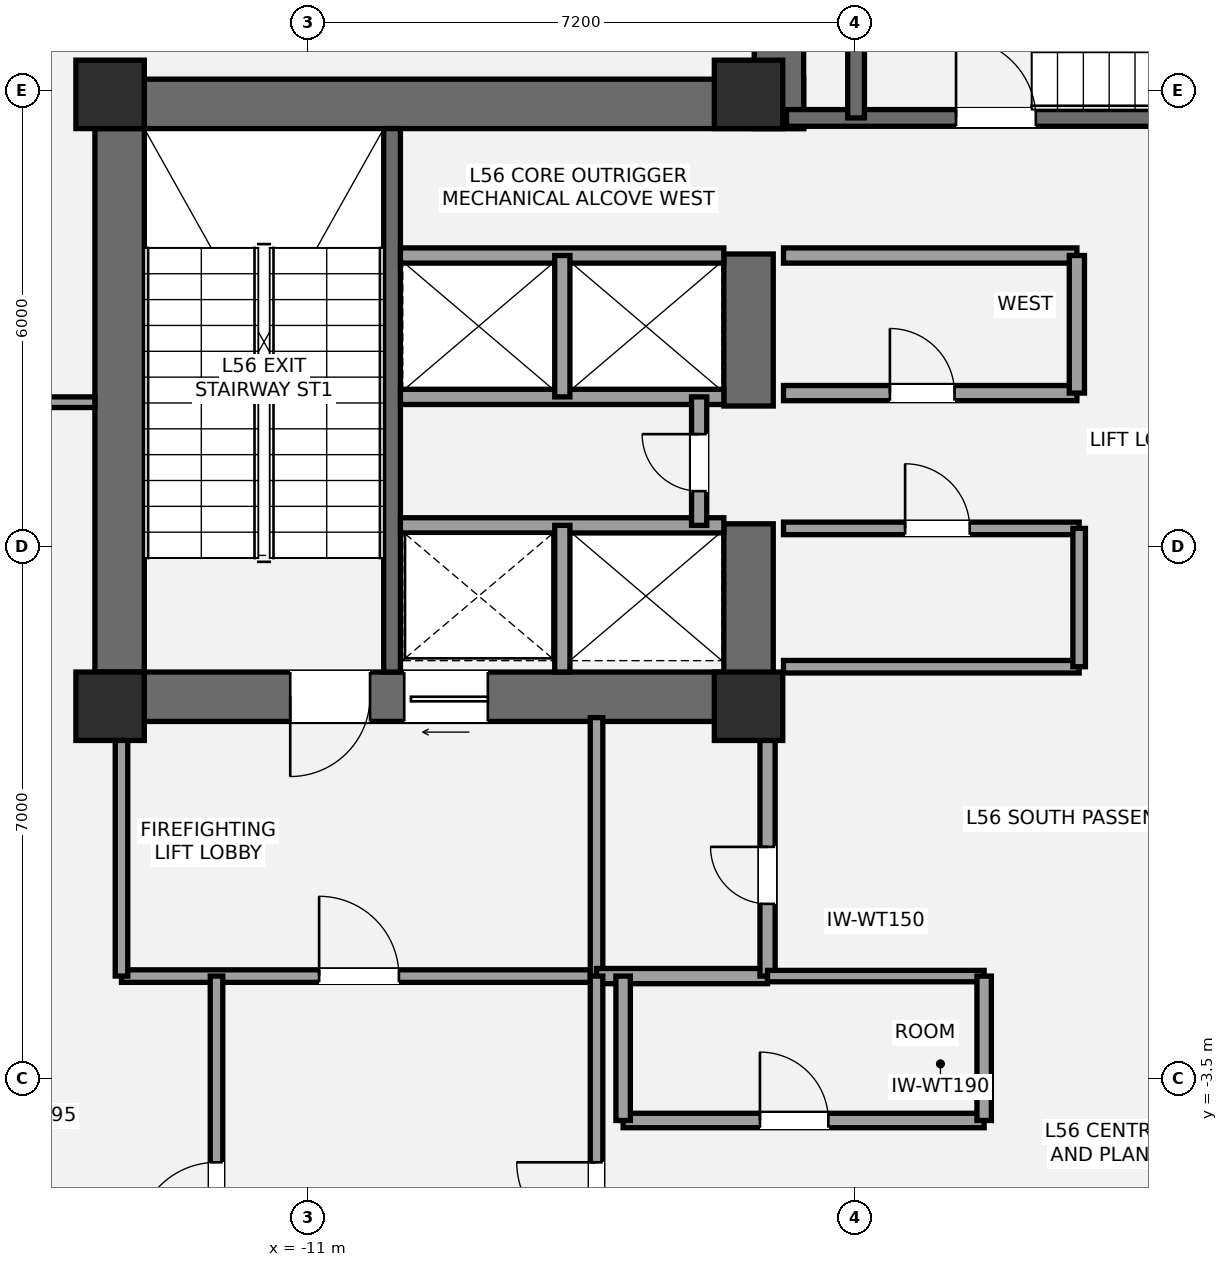
"""IFC4 building model, lengths in metres.
Left out: names, types, materials, properties, quantities, classifications, styles, units other than length and angle.
Written with IfcOpenShell. Run it as: python <this file> out.ifc"""

import sys

from ifc_helpers import new_model, si_unit, direction, frame, frame_2d, origin, origin_2d, place, context, subcontext, project, spatial, rectangle, extrude, element, fill, save


model = new_model("IFC4")
c1 = context("Model", 3, precision=1e-05, world=origin(), true_north=direction((0.0, 1.0)))
c2 = subcontext(c1, "Body", "Model", "MODEL_VIEW")
j1 = project(units=[si_unit("LENGTHUNIT", "METRE"), si_unit("PLANEANGLEUNIT", "RADIAN")], contexts=[c1])
p1 = place(None, origin())
s1 = spatial("IfcSite", under=j1, at=p1, CompositionType="ELEMENT")
p2 = place(p1, origin())
s2 = spatial("IfcBuilding", under=s1, at=p2, CompositionType="ELEMENT")
p3 = place(p2, frame((0.0, 0.0, 201.4)))
s3 = spatial("IfcBuildingStorey", under=s2, at=p3, CompositionType="ELEMENT", Elevation=201.4)
p4 = place(p3, frame((-13.475, 1.2, 0.0), z_axis=(0.0, 0.0, 1.0), x_axis=(0.0, 1.0, 0.0)))
e1 = element("IfcWall", 1, at=p4, inside=s3, PredefinedType="SHEAR", context=c2, shape_type="SweptSolid", body=[
    extrude(rectangle(XDim=8.45, YDim=0.65, at=frame_2d((4.225, 0.0))), origin(), (0.0, 0.0, 1.0), 4.5),
])
p5 = place(p3, frame((-13.8, 9.325, 0.0), z_axis=(0.0, 0.0, 1.0), x_axis=(1.0, 0.0, 0.0)))
e2 = element("IfcWall", 2, at=p5, inside=s3, PredefinedType="SHEAR", context=c2, shape_type="SweptSolid", body=[
    extrude(rectangle(XDim=9.325, YDim=0.65, at=frame_2d((4.663, 0.0))), origin(), (0.0, 0.0, 1.0), 4.5),
])
p6 = place(p3, frame((-4.875, 1.525, 0.0), z_axis=(0.0, 0.0, 1.0), x_axis=(-1.0, 0.0, 0.0)))
e3 = element("IfcWall", 3, at=p6, inside=s3, PredefinedType="SHEAR", context=c2, shape_type="SweptSolid", body=[
    extrude(rectangle(XDim=8.925, YDim=0.65, at=frame_2d((4.462, 0.0))), origin(), (0.0, 0.0, 1.0), 4.5),
])
p7 = place(p6, frame((5.305, 0.0, 0.0)))
e4 = element("IfcOpeningElement", 4, at=p7, cuts=e3, PredefinedType="OPENING", context=c2, shape_type="SweptSolid", body=[
    extrude(rectangle(XDim=1.05, YDim=2.15, at=frame_2d((0.525, 1.075))), frame((0.0, 0.335, 0.0), z_axis=(0.0, -1.0, 0.0), x_axis=(1.0, 0.0, 0.0)), (0.0, 0.0, 1.0), 0.67),
])
p8 = place(p6, frame((3.755, 0.0, 0.0)))
e5 = element("IfcOpeningElement", 5, at=p8, cuts=e3, PredefinedType="OPENING", context=c2, shape_type="SweptSolid", body=[
    extrude(rectangle(XDim=1.1, YDim=2.2, at=frame_2d((0.55, 1.1))), frame((0.0, 0.335, 0.0), z_axis=(0.0, -1.0, 0.0), x_axis=(1.0, 0.0, 0.0)), (0.0, 0.0, 1.0), 0.67),
])
p9 = place(p3, frame((-5.2, 1.2, 0.0), z_axis=(0.0, 0.0, 1.0), x_axis=(0.0, 1.0, 0.0)))
e6 = element("IfcWall", 6, at=p9, inside=s3, PredefinedType="SHEAR", context=c2, shape_type="SweptSolid", body=[
    extrude(rectangle(XDim=2.6, YDim=0.65, at=frame_2d((1.3, 0.0))), origin(), (0.0, 0.0, 1.0), 4.5),
])
p10 = place(p3, frame((-5.2, 5.35, 0.0), z_axis=(0.0, 0.0, 1.0), x_axis=(0.0, 1.0, 0.0)))
e7 = element("IfcWall", 7, at=p10, inside=s3, PredefinedType="SHEAR", context=c2, shape_type="SweptSolid", body=[
    extrude(rectangle(XDim=2.0, YDim=0.65, at=frame_2d((1.0, 0.0))), origin(), (0.0, 0.0, 1.0), 4.5),
])
p11 = place(p3, frame((-9.89, 1.85, 0.0), z_axis=(0.0, 0.0, 1.0), x_axis=(0.0, 1.0, 0.0)))
e8 = element("IfcWall", 8, at=p11, inside=s3, PredefinedType="SHEAR", context=c2, shape_type="SweptSolid", body=[
    extrude(rectangle(XDim=7.15, YDim=0.22, at=frame_2d((3.575, 0.0))), origin(), (0.0, 0.0, 1.0), 4.5),
])
p12 = place(p3, frame((-4.8, 9.0, 0.0), z_axis=(0.0, 0.0, 1.0), x_axis=(0.0, 1.0, 0.0)))
e9 = element("IfcWall", 9, at=p12, inside=s3, PredefinedType="SHEAR", context=c2, shape_type="SweptSolid", body=[
    extrude(rectangle(XDim=4.05, YDim=0.65, at=frame_2d((2.025, 0.0))), origin(), (0.0, 0.0, 1.0), 4.5),
])
p13 = place(p3, frame((-4.7, 9.14, 0.0), z_axis=(0.0, 0.0, 1.0), x_axis=(1.0, 0.0, 0.0)))
e10 = element("IfcWall", 10, at=p13, inside=s3, PredefinedType="SHEAR", context=c2, shape_type="SweptSolid", body=[
    extrude(rectangle(XDim=9.3, YDim=0.22, at=frame_2d((4.65, 0.0))), origin(), (0.0, 0.0, 1.0), 4.5),
])
p14 = place(p13, frame((2.23, 0.0, 0.0)))
e11 = element("IfcOpeningElement", 11, at=p14, cuts=e10, PredefinedType="OPENING", context=c2, shape_type="SweptSolid", body=[
    extrude(rectangle(XDim=1.05, YDim=2.15, at=frame_2d((0.525, 1.075))), frame((0.0, 0.12, 0.0), z_axis=(0.0, -1.0, 0.0), x_axis=(1.0, 0.0, 0.0)), (0.0, 0.0, 1.0), 0.24),
])
p15 = place(p3, frame((-3.785, 9.14, 0.0), z_axis=(0.0, 0.0, 1.0), x_axis=(0.0, 1.0, 0.0)))
e12 = element("IfcWall", 12, at=p15, inside=s3, PredefinedType="SHEAR", context=c2, shape_type="SweptSolid", body=[
    extrude(rectangle(XDim=3.26, YDim=0.22, at=frame_2d((1.63, 0.0))), origin(), (0.0, 0.0, 1.0), 4.5),
])
for number, where, z_axis, x_axis in (
    (13, (-13.6, 1.4, 0.0), (0.0, 0.0, 1.0), (1.0, 0.0, 0.0)),
    (14, (-13.6, 9.45, 0.0), (0.0, 0.0, 1.0), (1.0, 0.0, 0.0)),
    (15, (-5.2, 1.4, 0.0), (0.0, 0.0, 1.0), (1.0, 0.0, 0.0)),
    (16, (-5.2, 9.45, 0.0), (0.0, 0.0, 1.0), (1.0, 0.0, 0.0)),
):
    element("IfcColumn", number, at=place(p3, frame(where, z_axis=z_axis, x_axis=x_axis)), inside=s3, PredefinedType="COLUMN", context=c2, shape_type="SweptSolid", body=[
        extrude(rectangle(XDim=0.9, YDim=0.9, at=origin_2d()), origin(), (0.0, 0.0, 1.0), 4.5),
    ])
p16 = place(p3, frame((-13.45, -2.15, 0.0), z_axis=(0.0, 0.0, 1.0), x_axis=(1.0, 0.0, 0.0)))
e17 = element("IfcWall", 17, at=p16, inside=s3, PredefinedType="PARTITIONING", context=c2, shape_type="SweptSolid", body=[
    extrude(rectangle(XDim=6.25, YDim=0.165, at=frame_2d((3.125, 0.0))), origin(), (0.0, 0.0, 1.0), 4.28),
])
p17 = place(p16, frame((2.6, 0.0, 0.0)))
e18 = element("IfcOpeningElement", 18, at=p17, cuts=e17, PredefinedType="OPENING", context=c2, shape_type="SweptSolid", body=[
    extrude(rectangle(XDim=1.05, YDim=2.15, at=frame_2d((0.525, 1.075))), frame((0.0, 0.093, 0.0), z_axis=(0.0, -1.0, 0.0), x_axis=(1.0, 0.0, 0.0)), (0.0, 0.0, 1.0), 0.185),
])
p18 = place(p3, frame((-13.45, -2.15, 0.0), z_axis=(0.0, 0.0, 1.0), x_axis=(0.0, 1.0, 0.0)))
e19 = element("IfcWall", 19, at=p18, inside=s3, PredefinedType="PARTITIONING", context=c2, shape_type="SweptSolid", body=[
    extrude(rectangle(XDim=3.4, YDim=0.165, at=frame_2d((1.7, 0.0))), origin(), (0.0, 0.0, 1.0), 2.47),
])
p19 = place(p3, frame((-7.2, -2.15, 0.0), z_axis=(0.0, 0.0, 1.0), x_axis=(0.0, 1.0, 0.0)))
e20 = element("IfcWall", 20, at=p19, inside=s3, PredefinedType="PARTITIONING", context=c2, shape_type="SweptSolid", body=[
    extrude(rectangle(XDim=3.4, YDim=0.165, at=frame_2d((1.7, 0.0))), origin(), (0.0, 0.0, 1.0), 4.28),
])
p20 = place(p3, frame((-7.2, -2.15, 0.0), z_axis=(0.0, 0.0, 1.0), x_axis=(1.0, 0.0, 0.0)))
e21 = element("IfcWall", 21, at=p20, inside=s3, PredefinedType="SOLIDWALL", context=c2, shape_type="SweptSolid", body=[
    extrude(rectangle(XDim=2.25, YDim=0.2, at=frame_2d((1.125, 0.0))), origin(), (0.0, 0.0, 1.0), 2.47),
])
p21 = place(p3, frame((-4.95, -2.15, 0.0), z_axis=(0.0, 0.0, 1.0), x_axis=(0.0, 1.0, 0.0)))
e22 = element("IfcWall", 22, at=p21, inside=s3, PredefinedType="SOLIDWALL", context=c2, shape_type="SweptSolid", body=[
    extrude(rectangle(XDim=3.4, YDim=0.2, at=frame_2d((1.7, 0.0))), origin(), (0.0, 0.0, 1.0), 2.47),
])
p22 = place(p21, frame((0.95, 0.0, 0.0)))
e23 = element("IfcOpeningElement", 23, at=p22, cuts=e22, PredefinedType="OPENING", context=c2, shape_type="SweptSolid", body=[
    extrude(rectangle(XDim=0.75, YDim=2.1, at=frame_2d((0.375, 1.05))), frame((0.0, 0.11, 0.0), z_axis=(0.0, -1.0, 0.0), x_axis=(1.0, 0.0, 0.0)), (0.0, 0.0, 1.0), 0.22),
])
p23 = place(p3, frame((-9.78, 3.78, 0.0), z_axis=(0.0, 0.0, 1.0), x_axis=(1.0, 0.0, 0.0)))
e24 = element("IfcWall", 24, at=p23, inside=s3, PredefinedType="SOLIDWALL", context=c2, shape_type="SweptSolid", body=[
    extrude(rectangle(XDim=4.255, YDim=0.2, at=frame_2d((2.127, 0.0))), origin(), (0.0, 0.0, 1.0), 4.28),
])
p24 = place(p3, frame((-7.65, 1.85, 0.0), z_axis=(0.0, 0.0, 1.0), x_axis=(0.0, 1.0, 0.0)))
e25 = element("IfcWall", 25, at=p24, inside=s3, PredefinedType="SOLIDWALL", context=c2, shape_type="SweptSolid", body=[
    extrude(rectangle(XDim=1.93, YDim=0.2, at=frame_2d((0.965, 0.0))), origin(), (0.0, 0.0, 1.0), 4.28),
])
for number, where, z_axis, x_axis in (
    (26, (-9.78, 5.47, 0.0), (0.0, 0.0, 1.0), (1.0, 0.0, 0.0)),
    (27, (-9.78, 7.33, 0.0), (0.0, 0.0, 1.0), (1.0, 0.0, 0.0)),
):
    element("IfcWall", number, at=place(p3, frame(where, z_axis=z_axis, x_axis=x_axis)), inside=s3, PredefinedType="SOLIDWALL", context=c2, shape_type="SweptSolid", body=[
        extrude(rectangle(XDim=4.255, YDim=0.2, at=frame_2d((2.127, 0.0))), origin(), (0.0, 0.0, 1.0), 4.28),
    ])
p25 = place(p3, frame((-7.65, 5.47, 0.0), z_axis=(0.0, 0.0, 1.0), x_axis=(0.0, 1.0, 0.0)))
e28 = element("IfcWall", 28, at=p25, inside=s3, PredefinedType="SOLIDWALL", context=c2, shape_type="SweptSolid", body=[
    extrude(rectangle(XDim=1.86, YDim=0.2, at=frame_2d((0.93, 0.0))), origin(), (0.0, 0.0, 1.0), 4.28),
])
p26 = place(p3, frame((-5.85, 3.78, 0.0), z_axis=(0.0, 0.0, 1.0), x_axis=(0.0, 1.0, 0.0)))
e29 = element("IfcWall", 29, at=p26, inside=s3, PredefinedType="SOLIDWALL", context=c2, shape_type="SweptSolid", body=[
    extrude(rectangle(XDim=1.69, YDim=0.2, at=frame_2d((0.845, 0.0))), origin(), (0.0, 0.0, 1.0), 4.28),
])
p27 = place(p26, frame((0.45, 0.0, 0.0)))
e30 = element("IfcOpeningElement", 30, at=p27, cuts=e29, PredefinedType="OPENING", context=c2, shape_type="SweptSolid", body=[
    extrude(rectangle(XDim=0.75, YDim=2.1, at=frame_2d((0.375, 1.05))), frame((0.0, 0.11, 0.0), z_axis=(0.0, -1.0, 0.0), x_axis=(1.0, 0.0, 0.0)), (0.0, 0.0, 1.0), 0.22),
])
p28 = place(p3, frame((-4.74, 1.92, 0.0), z_axis=(0.0, 0.0, 1.0), x_axis=(1.0, 0.0, 0.0)))
e31 = element("IfcWall", 31, at=p28, inside=s3, PredefinedType="PARTITIONING", context=c2, shape_type="SweptSolid", body=[
    extrude(rectangle(XDim=3.89, YDim=0.165, at=frame_2d((1.945, 0.0))), origin(), (0.0, 0.0, 1.0), 3.42),
])
p29 = place(p3, frame((-4.74, 3.74, 0.0), z_axis=(0.0, 0.0, 1.0), x_axis=(1.0, 0.0, 0.0)))
e32 = element("IfcWall", 32, at=p29, inside=s3, PredefinedType="PARTITIONING", context=c2, shape_type="SweptSolid", body=[
    extrude(rectangle(XDim=3.89, YDim=0.165, at=frame_2d((1.945, 0.0))), origin(), (0.0, 0.0, 1.0), 4.28),
])
p30 = place(p29, frame((1.6, 0.0, 0.0)))
e33 = element("IfcOpeningElement", 33, at=p30, cuts=e32, PredefinedType="OPENING", context=c2, shape_type="SweptSolid", body=[
    extrude(rectangle(XDim=0.85, YDim=2.1, at=frame_2d((0.425, 1.05))), frame((0.0, 0.093, 0.0), z_axis=(0.0, -1.0, 0.0), x_axis=(1.0, 0.0, 0.0)), (0.0, 0.0, 1.0), 0.185),
])
p31 = place(p3, frame((-0.85, 1.92, 0.0), z_axis=(0.0, 0.0, 1.0), x_axis=(0.0, 1.0, 0.0)))
e34 = element("IfcWall", 34, at=p31, inside=s3, PredefinedType="PARTITIONING", context=c2, shape_type="SweptSolid", body=[
    extrude(rectangle(XDim=1.82, YDim=0.165, at=frame_2d((0.91, 0.0))), origin(), (0.0, 0.0, 1.0), 4.28),
])
p32 = place(p3, frame((-4.74, 5.52, 0.0), z_axis=(0.0, 0.0, 1.0), x_axis=(1.0, 0.0, 0.0)))
e35 = element("IfcWall", 35, at=p32, inside=s3, PredefinedType="SOLIDWALL", context=c2, shape_type="SweptSolid", body=[
    extrude(rectangle(XDim=3.86, YDim=0.2, at=frame_2d((1.93, 0.0))), origin(), (0.0, 0.0, 1.0), 4.28),
])
p33 = place(p32, frame((1.4, 0.0, 0.0)))
e36 = element("IfcOpeningElement", 36, at=p33, cuts=e35, PredefinedType="OPENING", context=c2, shape_type="SweptSolid", body=[
    extrude(rectangle(XDim=0.85, YDim=2.1, at=frame_2d((0.425, 1.05))), frame((0.0, 0.11, 0.0), z_axis=(0.0, -1.0, 0.0), x_axis=(1.0, 0.0, 0.0)), (0.0, 0.0, 1.0), 0.22),
])
p34 = place(p3, frame((-4.74, 7.33, 0.0), z_axis=(0.0, 0.0, 1.0), x_axis=(1.0, 0.0, 0.0)))
e37 = element("IfcWall", 37, at=p34, inside=s3, PredefinedType="SOLIDWALL", context=c2, shape_type="SweptSolid", body=[
    extrude(rectangle(XDim=3.86, YDim=0.2, at=frame_2d((1.93, 0.0))), origin(), (0.0, 0.0, 1.0), 4.28),
])
p35 = place(p3, frame((-0.88, 5.52, 0.0), z_axis=(0.0, 0.0, 1.0), x_axis=(0.0, 1.0, 0.0)))
e38 = element("IfcWall", 38, at=p35, inside=s3, PredefinedType="SOLIDWALL", context=c2, shape_type="SweptSolid", body=[
    extrude(rectangle(XDim=1.81, YDim=0.2, at=frame_2d((0.905, 0.0))), origin(), (0.0, 0.0, 1.0), 4.28),
])
p36 = place(p3, frame((-6.85, -4.05, 0.0), z_axis=(0.0, 0.0, 1.0), x_axis=(1.0, 0.0, 0.0)))
e39 = element("IfcWall", 39, at=p36, inside=s3, PredefinedType="PLUMBINGWALL", context=c2, shape_type="SweptSolid", body=[
    extrude(rectangle(XDim=4.75, YDim=0.19, at=frame_2d((2.375, 0.0))), origin(), (0.0, 0.0, 1.0), 2.47),
])
p37 = place(p36, frame((1.8, 0.0, 0.0)))
e40 = element("IfcOpeningElement", 40, at=p37, cuts=e39, PredefinedType="OPENING", context=c2, shape_type="SweptSolid", body=[
    extrude(rectangle(XDim=0.9, YDim=2.1, at=frame_2d((0.45, 1.05))), frame((0.0, 0.105, 0.0), z_axis=(0.0, -1.0, 0.0), x_axis=(1.0, 0.0, 0.0)), (0.0, 0.0, 1.0), 0.21),
])
p38 = place(p3, frame((-4.95, -2.15, 0.0), z_axis=(0.0, 0.0, 1.0), x_axis=(1.0, 0.0, 0.0)))
e41 = element("IfcWall", 41, at=p38, inside=s3, PredefinedType="PLUMBINGWALL", context=c2, shape_type="SweptSolid", body=[
    extrude(rectangle(XDim=2.85, YDim=0.15, at=frame_2d((1.425, 0.0))), origin(), (0.0, 0.0, 1.0), 4.28),
])
for number, where, z_axis, x_axis in (
    (42, (-6.85, -4.05, 0.0), (0.0, 0.0, 1.0), (0.0, 1.0, 0.0)),
    (43, (-2.1, -4.05, 0.0), (0.0, 0.0, 1.0), (0.0, 1.0, 0.0)),
):
    element("IfcWall", number, at=place(p3, frame(where, z_axis=z_axis, x_axis=x_axis)), inside=s3, PredefinedType="PLUMBINGWALL", context=c2, shape_type="SweptSolid", body=[
        extrude(rectangle(XDim=1.9, YDim=0.19, at=frame_2d((0.95, 0.0))), origin(), (0.0, 0.0, 1.0), 4.28),
    ])
p39 = place(p3, frame((-12.2, -6.85, 0.0), z_axis=(0.0, 0.0, 1.0), x_axis=(0.0, 1.0, 0.0)))
e44 = element("IfcWall", 44, at=p39, inside=s3, PredefinedType="PARTITIONING", context=c2, shape_type="SweptSolid", body=[
    extrude(rectangle(XDim=4.7, YDim=0.165, at=frame_2d((2.35, 0.0))), origin(), (0.0, 0.0, 1.0), 3.733),
])
p40 = place(p39, frame((1.2, 0.0, 0.0)))
e45 = element("IfcOpeningElement", 45, at=p40, cuts=e44, PredefinedType="OPENING", context=c2, shape_type="SweptSolid", body=[
    extrude(rectangle(XDim=1.05, YDim=2.15, at=frame_2d((0.525, 1.075))), frame((0.0, 0.093, 0.0), z_axis=(0.0, -1.0, 0.0), x_axis=(1.0, 0.0, 0.0)), (0.0, 0.0, 1.0), 0.185),
])
p41 = place(p3, frame((-7.2, -6.85, 0.0), z_axis=(0.0, 0.0, 1.0), x_axis=(0.0, 1.0, 0.0)))
e46 = element("IfcWall", 46, at=p41, inside=s3, PredefinedType="PARTITIONING", context=c2, shape_type="SweptSolid", body=[
    extrude(rectangle(XDim=4.7, YDim=0.165, at=frame_2d((2.35, 0.0))), origin(), (0.0, 0.0, 1.0), 3.733),
])
p42 = place(p41, frame((1.2, 0.0, 0.0)))
e47 = element("IfcOpeningElement", 47, at=p42, cuts=e46, PredefinedType="OPENING", context=c2, shape_type="SweptSolid", body=[
    extrude(rectangle(XDim=1.05, YDim=2.15, at=frame_2d((0.525, 1.075))), frame((0.0, 0.093, 0.0), z_axis=(0.0, -1.0, 0.0), x_axis=(1.0, 0.0, 0.0)), (0.0, 0.0, 1.0), 0.185),
])
p43 = place(p3, frame((-21.275, 5.4, 0.0), z_axis=(0.0, 0.0, 1.0), x_axis=(1.0, 0.0, 0.0)))
e48 = element("IfcWall", 48, at=p43, inside=s3, PredefinedType="PARTITIONING", context=c2, shape_type="SweptSolid", body=[
    extrude(rectangle(XDim=7.475, YDim=0.14, at=frame_2d((3.737, 0.0))), origin(), (0.0, 0.0, 1.0), 3.733),
])
p44 = place(p43, frame((5.924, 0.0, 0.0)))
e49 = element("IfcOpeningElement", 49, at=p44, cuts=e48, PredefinedType="OPENING", context=c2, shape_type="SweptSolid", body=[
    extrude(rectangle(XDim=0.95, YDim=2.15, at=frame_2d((0.475, 1.075))), frame((0.0, 0.08, 0.0), z_axis=(0.0, -1.0, 0.0), x_axis=(1.0, 0.0, 0.0)), (0.0, 0.0, 1.0), 0.16),
])
p45 = place(p7, origin())
e50 = element("IfcDoor", 50, at=p45, inside=s3, OperationType="SINGLE_SWING_RIGHT", PredefinedType="DOOR", context=c2, shape_type="SweptSolid", body=[
    extrude(rectangle(XDim=1.05, YDim=2.15, at=frame_2d((0.525, 1.075))), frame((0.0, 0.025, 0.0), z_axis=(0.0, -1.0, 0.0), x_axis=(1.0, 0.0, 0.0)), (0.0, 0.0, 1.0), 0.05),
])
fill(e4, e50)
p46 = place(p14, origin())
e51 = element("IfcDoor", 51, at=p46, inside=s3, OperationType="SINGLE_SWING_LEFT", PredefinedType="DOOR", context=c2, shape_type="SweptSolid", body=[
    extrude(rectangle(XDim=1.05, YDim=2.15, at=frame_2d((0.525, 1.075))), frame((0.0, 0.025, 0.0), z_axis=(0.0, -1.0, 0.0), x_axis=(1.0, 0.0, 0.0)), (0.0, 0.0, 1.0), 0.05),
])
fill(e11, e51)
p47 = place(p22, origin())
e52 = element("IfcDoor", 52, at=p47, inside=s3, OperationType="SINGLE_SWING_RIGHT", PredefinedType="DOOR", context=c2, shape_type="SweptSolid", body=[
    extrude(rectangle(XDim=0.75, YDim=2.1, at=frame_2d((0.375, 1.05))), frame((0.0, 0.025, 0.0), z_axis=(0.0, -1.0, 0.0), x_axis=(1.0, 0.0, 0.0)), (0.0, 0.0, 1.0), 0.05),
])
fill(e23, e52)
p48 = place(p8, origin())
e53 = element("IfcDoor", 53, at=p48, inside=s3, OperationType="SLIDING_TO_LEFT", PredefinedType="DOOR", context=c2, shape_type="SweptSolid", body=[
    extrude(rectangle(XDim=1.1, YDim=2.2, at=frame_2d((0.55, 1.1))), frame((0.0, 0.025, 0.0), z_axis=(0.0, -1.0, 0.0), x_axis=(1.0, 0.0, 0.0)), (0.0, 0.0, 1.0), 0.05),
])
fill(e5, e53)
p49 = place(p27, origin())
e54 = element("IfcDoor", 54, at=p49, inside=s3, OperationType="SINGLE_SWING_RIGHT", PredefinedType="DOOR", context=c2, shape_type="SweptSolid", body=[
    extrude(rectangle(XDim=0.75, YDim=2.1, at=frame_2d((0.375, 1.05))), frame((0.0, 0.025, 0.0), z_axis=(0.0, -1.0, 0.0), x_axis=(1.0, 0.0, 0.0)), (0.0, 0.0, 1.0), 0.05),
])
fill(e30, e54)
p50 = place(p30, origin())
e55 = element("IfcDoor", 55, at=p50, inside=s3, OperationType="SINGLE_SWING_LEFT", PredefinedType="DOOR", context=c2, shape_type="SweptSolid", body=[
    extrude(rectangle(XDim=0.85, YDim=2.1, at=frame_2d((0.425, 1.05))), frame((0.0, 0.025, 0.0), z_axis=(0.0, -1.0, 0.0), x_axis=(1.0, 0.0, 0.0)), (0.0, 0.0, 1.0), 0.05),
])
fill(e33, e55)
p51 = place(p33, origin())
e56 = element("IfcDoor", 56, at=p51, inside=s3, OperationType="SINGLE_SWING_LEFT", PredefinedType="DOOR", context=c2, shape_type="SweptSolid", body=[
    extrude(rectangle(XDim=0.85, YDim=2.1, at=frame_2d((0.425, 1.05))), frame((0.0, 0.025, 0.0), z_axis=(0.0, -1.0, 0.0), x_axis=(1.0, 0.0, 0.0)), (0.0, 0.0, 1.0), 0.05),
])
fill(e36, e56)
p52 = place(p37, origin())
e57 = element("IfcDoor", 57, at=p52, inside=s3, OperationType="SINGLE_SWING_LEFT", PredefinedType="DOOR", context=c2, shape_type="SweptSolid", body=[
    extrude(rectangle(XDim=0.9, YDim=2.1, at=frame_2d((0.45, 1.05))), frame((0.0, 0.025, 0.0), z_axis=(0.0, -1.0, 0.0), x_axis=(1.0, 0.0, 0.0)), (0.0, 0.0, 1.0), 0.05),
])
fill(e40, e57)
p53 = place(p17, origin())
e58 = element("IfcDoor", 58, at=p53, inside=s3, OperationType="SINGLE_SWING_LEFT", PredefinedType="DOOR", context=c2, shape_type="SweptSolid", body=[
    extrude(rectangle(XDim=1.05, YDim=2.15, at=frame_2d((0.525, 1.075))), frame((0.0, 0.025, 0.0), z_axis=(0.0, -1.0, 0.0), x_axis=(1.0, 0.0, 0.0)), (0.0, 0.0, 1.0), 0.05),
])
fill(e18, e58)
p54 = place(p40, origin())
e59 = element("IfcDoor", 59, at=p54, inside=s3, OperationType="SINGLE_SWING_LEFT", PredefinedType="DOOR", context=c2, shape_type="SweptSolid", body=[
    extrude(rectangle(XDim=1.05, YDim=2.15, at=frame_2d((0.525, 1.075))), frame((0.0, 0.025, 0.0), z_axis=(0.0, -1.0, 0.0), x_axis=(1.0, 0.0, 0.0)), (0.0, 0.0, 1.0), 0.05),
])
fill(e45, e59)
p55 = place(p42, origin())
e60 = element("IfcDoor", 60, at=p55, inside=s3, OperationType="SINGLE_SWING_RIGHT", PredefinedType="DOOR", context=c2, shape_type="SweptSolid", body=[
    extrude(rectangle(XDim=1.05, YDim=2.15, at=frame_2d((0.525, 1.075))), frame((0.0, 0.025, 0.0), z_axis=(0.0, -1.0, 0.0), x_axis=(1.0, 0.0, 0.0)), (0.0, 0.0, 1.0), 0.05),
])
fill(e47, e60)
save(model, sys.argv[1])
